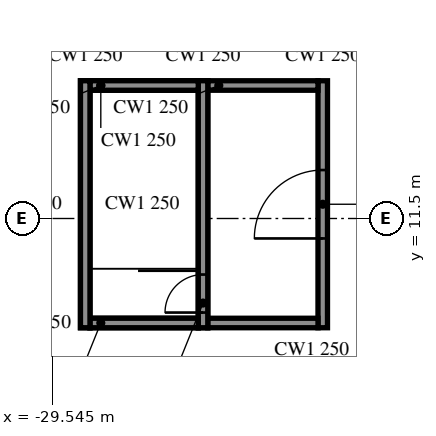
"""IFC4 building model, lengths in metres.
Left out: names, types, materials, properties, quantities, classifications, styles, units other than length and angle.
Written with IfcOpenShell. Run it as: python <this file> out.ifc"""

import sys

from ifc_helpers import new_model, si_unit, direction, frame, frame_2d, origin, place, context, subcontext, project, spatial, rectangle, extrude, element, fill, save


model = new_model("IFC4")
c1 = context("Model", 3, precision=1e-05, world=origin(), true_north=direction((0.0, 1.0)))
c2 = subcontext(c1, "Body", "Model", "MODEL_VIEW")
j1 = project(units=[si_unit("LENGTHUNIT", "METRE"), si_unit("PLANEANGLEUNIT", "RADIAN")], contexts=[c1])
p1 = place(None, origin())
s1 = spatial("IfcSite", under=j1, at=p1, CompositionType="ELEMENT")
p2 = place(p1, origin())
s2 = spatial("IfcBuilding", under=s1, at=p2, CompositionType="ELEMENT")
p3 = place(p2, frame((0.0, 0.0, 289.7)))
s3 = spatial("IfcBuildingStorey", under=s2, at=p3, CompositionType="ELEMENT", Elevation=289.7)
for number, where, z_axis, x_axis in (
    (1, (-28.675, 8.625, -3.6), (0.0, 0.0, 1.0), (0.0, 1.0, 0.0)),
    (2, (-25.575, 8.625, -3.6), (0.0, 0.0, 1.0), (0.0, 1.0, 0.0)),
):
    element("IfcWall", number, at=place(p3, frame(where, z_axis=z_axis, x_axis=x_axis)), inside=s3, PredefinedType="SOLIDWALL", context=c2, shape_type="SweptSolid", body=[
        extrude(rectangle(XDim=6.5, YDim=0.25, at=frame_2d((3.25, 0.0))), origin(), (0.0, 0.0, 1.0), 3.2),
    ])
for number, where, z_axis, x_axis in (
    (3, (-28.55, 8.75, -3.6), (0.0, 0.0, 1.0), (1.0, 0.0, 0.0)),
    (4, (-28.55, 15.0, -3.6), (0.0, 0.0, 1.0), (1.0, 0.0, 0.0)),
):
    element("IfcWall", number, at=place(p3, frame(where, z_axis=z_axis, x_axis=x_axis)), inside=s3, PredefinedType="SOLIDWALL", context=c2, shape_type="SweptSolid", body=[
        extrude(rectangle(XDim=2.85, YDim=0.25, at=frame_2d((1.425, 0.0))), origin(), (0.0, 0.0, 1.0), 3.2),
    ])
p4 = place(p3, frame((-28.675, 8.625, 0.0), z_axis=(0.0, 0.0, 1.0), x_axis=(0.0, 1.0, 0.0)))
e5 = element("IfcWall", 5, at=p4, inside=s3, PredefinedType="SOLIDWALL", context=c2, shape_type="SweptSolid", body=[
    extrude(rectangle(XDim=6.5, YDim=0.25, at=frame_2d((3.25, 0.0))), origin(), (0.0, 0.0, 1.0), 3.0),
])
p5 = place(p3, frame((-25.575, 8.625, 0.0), z_axis=(0.0, 0.0, 1.0), x_axis=(0.0, 1.0, 0.0)))
e6 = element("IfcWall", 6, at=p5, inside=s3, PredefinedType="SOLIDWALL", context=c2, shape_type="SweptSolid", body=[
    extrude(rectangle(XDim=6.5, YDim=0.25, at=frame_2d((3.25, 0.0))), origin(), (0.0, 0.0, 1.0), 3.0),
])
p6 = place(p5, frame((0.4, 0.0, 0.0)))
e7 = element("IfcOpeningElement", 7, at=p6, cuts=e6, PredefinedType="OPENING", context=c2, shape_type="SweptSolid", body=[
    extrude(rectangle(XDim=1.0, YDim=2.1, at=frame_2d((0.5, 1.05))), frame((0.0, 0.135, 0.0), z_axis=(0.0, -1.0, 0.0), x_axis=(1.0, 0.0, 0.0)), (0.0, 0.0, 1.0), 0.27),
])
for number, where, z_axis, x_axis in (
    (8, (-28.55, 8.75, 0.0), (0.0, 0.0, 1.0), (1.0, 0.0, 0.0)),
    (9, (-28.55, 15.0, 0.0), (0.0, 0.0, 1.0), (1.0, 0.0, 0.0)),
):
    element("IfcWall", number, at=place(p3, frame(where, z_axis=z_axis, x_axis=x_axis)), inside=s3, PredefinedType="SOLIDWALL", context=c2, shape_type="SweptSolid", body=[
        extrude(rectangle(XDim=2.85, YDim=0.25, at=frame_2d((1.425, 0.0))), origin(), (0.0, 0.0, 1.0), 3.0),
    ])
p7 = place(p3, frame((-22.425, 8.625, 0.0), z_axis=(0.0, 0.0, 1.0), x_axis=(0.0, 1.0, 0.0)))
e10 = element("IfcWall", 10, at=p7, inside=s3, PredefinedType="SOLIDWALL", context=c2, shape_type="SweptSolid", body=[
    extrude(rectangle(XDim=6.5, YDim=0.25, at=frame_2d((3.25, 0.0))), origin(), (0.0, 0.0, 1.0), 3.0),
])
p8 = place(p7, frame((2.35, 0.0, 0.0)))
e11 = element("IfcOpeningElement", 11, at=p8, cuts=e10, PredefinedType="OPENING", context=c2, shape_type="SweptSolid", body=[
    extrude(rectangle(XDim=1.8, YDim=2.1, at=frame_2d((0.9, 1.05))), frame((0.0, 0.135, 0.0), z_axis=(0.0, -1.0, 0.0), x_axis=(1.0, 0.0, 0.0)), (0.0, 0.0, 1.0), 0.27),
])
for number, where, z_axis, x_axis in (
    (12, (-25.45, 8.75, 0.0), (0.0, 0.0, 1.0), (1.0, 0.0, 0.0)),
    (13, (-25.45, 15.0, 0.0), (0.0, 0.0, 1.0), (1.0, 0.0, 0.0)),
):
    element("IfcWall", number, at=place(p3, frame(where, z_axis=z_axis, x_axis=x_axis)), inside=s3, PredefinedType="SOLIDWALL", context=c2, shape_type="SweptSolid", body=[
        extrude(rectangle(XDim=2.9, YDim=0.25, at=frame_2d((1.45, 0.0))), origin(), (0.0, 0.0, 1.0), 3.0),
    ])
p9 = place(p6, origin())
e14 = element("IfcDoor", 14, at=p9, inside=s3, OperationType="SINGLE_SWING_LEFT", PredefinedType="DOOR", context=c2, shape_type="SweptSolid", body=[
    extrude(rectangle(XDim=1.0, YDim=2.1, at=frame_2d((0.5, 1.05))), frame((0.0, 0.025, 0.0), z_axis=(0.0, -1.0, 0.0), x_axis=(1.0, 0.0, 0.0)), (0.0, 0.0, 1.0), 0.05),
])
fill(e7, e14)
p10 = place(p8, origin())
e15 = element("IfcDoor", 15, at=p10, inside=s3, OperationType="DOUBLE_DOOR_SINGLE_SWING", PredefinedType="DOOR", context=c2, shape_type="SweptSolid", body=[
    extrude(rectangle(XDim=1.8, YDim=2.1, at=frame_2d((0.9, 1.05))), frame((0.0, 0.025, 0.0), z_axis=(0.0, -1.0, 0.0), x_axis=(1.0, 0.0, 0.0)), (0.0, 0.0, 1.0), 0.05),
])
fill(e11, e15)
save(model, sys.argv[1])
